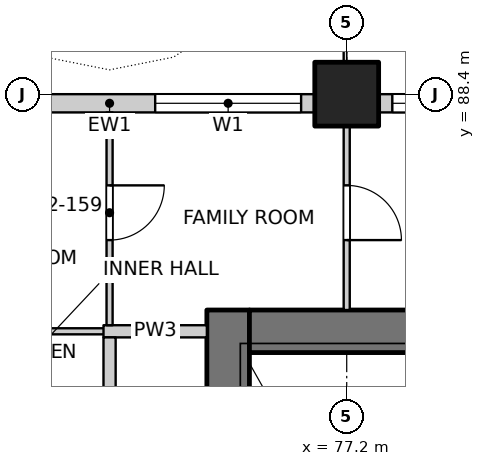
"""IFC4 building model, lengths in metres.
Left out: names, types, materials, properties, quantities, classifications, styles, units other than length and angle.
Written with IfcOpenShell. Run it as: python <this file> out.ifc"""

import sys

from ifc_helpers import new_model, si_unit, direction, frame, frame_2d, origin, origin_2d, place, context, subcontext, project, spatial, rectangle, extrude, element, fill, save


model = new_model("IFC4")
c1 = context("Model", 3, precision=1e-05, world=origin(), true_north=direction((0.0, 1.0)))
c2 = subcontext(c1, "Body", "Model", "MODEL_VIEW")
j1 = project(units=[si_unit("LENGTHUNIT", "METRE"), si_unit("PLANEANGLEUNIT", "RADIAN")], contexts=[c1])
p1 = place(None, origin())
s1 = spatial("IfcSite", under=j1, at=p1, CompositionType="ELEMENT")
p2 = place(p1, origin())
s2 = spatial("IfcBuilding", under=s1, at=p2, CompositionType="ELEMENT")
p3 = place(p2, frame((0.0, 0.0, 36.5)))
s3 = spatial("IfcBuildingStorey", under=s2, at=p3, CompositionType="ELEMENT", Elevation=36.5)
p4 = place(p3, frame((77.2, 88.4, -0.25), z_axis=(0.0, 0.0, 1.0), x_axis=(1.0, 0.0, 0.0)))
e1 = element("IfcColumn", 1, at=p4, inside=s3, PredefinedType="COLUMN", context=c2, shape_type="SweptSolid", body=[
    extrude(rectangle(XDim=1.05, YDim=1.05, at=origin_2d()), origin(), (0.0, 0.0, 1.0), 3.4),
])
p5 = place(p3, frame((75.25, 77.3, -0.25), z_axis=(0.0, 0.0, 1.0), x_axis=(0.0, 1.0, 0.0)))
e2 = element("IfcWall", 2, at=p5, inside=s3, PredefinedType="SOLIDWALL", context=c2, shape_type="SweptSolid", body=[
    extrude(rectangle(XDim=7.55, YDim=0.7, at=frame_2d((3.775, 0.0))), origin(), (0.0, 0.0, 1.0), 3.4),
])
p6 = place(p5, frame((0.3, 0.0, 0.25)))
e3 = element("IfcOpeningElement", 3, at=p6, cuts=e2, PredefinedType="OPENING", context=c2, shape_type="SweptSolid", body=[
    extrude(rectangle(XDim=1.2, YDim=2.1, at=frame_2d((0.6, 1.05))), frame((0.0, 0.36, 0.0), z_axis=(0.0, -1.0, 0.0), x_axis=(1.0, 0.0, 0.0)), (0.0, 0.0, 1.0), 0.72),
])
p7 = place(p3, frame((75.6, 84.5, -0.25), z_axis=(0.0, 0.0, 1.0), x_axis=(1.0, 0.0, 0.0)))
e4 = element("IfcWall", 4, at=p7, inside=s3, PredefinedType="SOLIDWALL", context=c2, shape_type="SweptSolid", body=[
    extrude(rectangle(XDim=18.8, YDim=0.7, at=frame_2d((9.4, 0.0))), origin(), (0.0, 0.0, 1.0), 3.4),
])
p8 = place(p3, frame((69.925, 88.25, 0.0), z_axis=(0.0, 0.0, 1.0), x_axis=(1.0, 0.0, 0.0)))
e5 = element("IfcWall", 5, at=p8, inside=s3, PredefinedType="SOLIDWALL", context=c2, shape_type="SweptSolid", body=[
    extrude(rectangle(XDim=6.75, YDim=0.3, at=frame_2d((3.375, 0.0))), origin(), (0.0, 0.0, 1.0), 2.7),
])
p9 = place(p8, frame((0.525, 0.0, 0.0)))
e6 = element("IfcOpeningElement", 6, at=p9, cuts=e5, PredefinedType="OPENING", context=c2, shape_type="SweptSolid", body=[
    extrude(rectangle(XDim=1.8, YDim=2.4, at=frame_2d((0.9, 1.2))), frame((0.0, 0.16, 0.0), z_axis=(0.0, -1.0, 0.0), x_axis=(1.0, 0.0, 0.0)), (0.0, 0.0, 1.0), 0.32),
])
p10 = place(p8, frame((4.125, 0.0, 0.9)))
e7 = element("IfcOpeningElement", 7, at=p10, cuts=e5, PredefinedType="OPENING", context=c2, shape_type="SweptSolid", body=[
    extrude(rectangle(XDim=2.4, YDim=1.8, at=frame_2d((1.2, 0.9))), frame((0.0, 0.16, 0.0), z_axis=(0.0, -1.0, 0.0), x_axis=(1.0, 0.0, 0.0)), (0.0, 0.0, 1.0), 0.32),
])
p11 = place(p3, frame((77.725, 88.25, 0.0), z_axis=(0.0, 0.0, 1.0), x_axis=(1.0, 0.0, 0.0)))
e8 = element("IfcWall", 8, at=p11, inside=s3, PredefinedType="SOLIDWALL", context=c2, shape_type="SweptSolid", body=[
    extrude(rectangle(XDim=6.75, YDim=0.3, at=frame_2d((3.375, 0.0))), origin(), (0.0, 0.0, 1.0), 2.7),
])
p12 = place(p11, frame((0.225, 0.0, 0.9)))
e9 = element("IfcOpeningElement", 9, at=p12, cuts=e8, PredefinedType="OPENING", context=c2, shape_type="SweptSolid", body=[
    extrude(rectangle(XDim=2.4, YDim=1.8, at=frame_2d((1.2, 0.9))), frame((0.0, 0.16, 0.0), z_axis=(0.0, -1.0, 0.0), x_axis=(1.0, 0.0, 0.0)), (0.0, 0.0, 1.0), 0.32),
])
p13 = place(p11, frame((4.125, 0.0, 0.9)))
e10 = element("IfcOpeningElement", 10, at=p13, cuts=e8, PredefinedType="OPENING", context=c2, shape_type="SweptSolid", body=[
    extrude(rectangle(XDim=2.4, YDim=1.8, at=frame_2d((1.2, 0.9))), frame((0.0, 0.16, 0.0), z_axis=(0.0, -1.0, 0.0), x_axis=(1.0, 0.0, 0.0)), (0.0, 0.0, 1.0), 0.32),
])
p14 = place(p3, frame((61.9, 84.5, 0.0), z_axis=(0.0, 0.0, 1.0), x_axis=(1.0, 0.0, 0.0)))
e11 = element("IfcWall", 11, at=p14, inside=s3, PredefinedType="PARTITIONING", context=c2, shape_type="SweptSolid", body=[
    extrude(rectangle(XDim=11.5, YDim=0.1, at=frame_2d((5.75, 0.0))), origin(), (0.0, 0.0, 1.0), 3.15),
])
p15 = place(p14, frame((7.965, 0.0, 0.0)))
e12 = element("IfcOpeningElement", 12, at=p15, cuts=e11, PredefinedType="OPENING", context=c2, shape_type="SweptSolid", body=[
    extrude(rectangle(XDim=0.9, YDim=2.1, at=frame_2d((0.45, 1.05))), frame((0.0, 0.06, 0.0), z_axis=(0.0, -1.0, 0.0), x_axis=(1.0, 0.0, 0.0)), (0.0, 0.0, 1.0), 0.12),
])
p16 = place(p3, frame((73.2, 84.5, 0.0), z_axis=(0.0, 0.0, 1.0), x_axis=(1.0, 0.0, 0.0)))
e13 = element("IfcWall", 13, at=p16, inside=s3, PredefinedType="PARTITIONING", context=c2, shape_type="SweptSolid", body=[
    extrude(rectangle(XDim=1.7, YDim=0.2, at=frame_2d((0.85, 0.0))), origin(), (0.0, 0.0, 1.0), 3.15),
])
p17 = place(p3, frame((73.3, 53.4, 0.0), z_axis=(0.0, 0.0, 1.0), x_axis=(0.0, 1.0, 0.0)))
e14 = element("IfcWall", 14, at=p17, inside=s3, PredefinedType="PARTITIONING", context=c2, shape_type="SweptSolid", body=[
    extrude(rectangle(XDim=31.0, YDim=0.2, at=frame_2d((15.5, 0.0))), origin(), (0.0, 0.0, 1.0), 3.15),
])
p18 = place(p17, frame((2.675, 0.0, 0.0)))
e15 = element("IfcOpeningElement", 15, at=p18, cuts=e14, PredefinedType="OPENING", context=c2, shape_type="SweptSolid", body=[
    extrude(rectangle(XDim=1.0, YDim=2.1, at=frame_2d((0.5, 1.05))), frame((0.0, 0.11, 0.0), z_axis=(0.0, -1.0, 0.0), x_axis=(1.0, 0.0, 0.0)), (0.0, 0.0, 1.0), 0.22),
])
p19 = place(p17, frame((18.125, 0.0, 0.0)))
e16 = element("IfcOpeningElement", 16, at=p19, cuts=e14, PredefinedType="OPENING", context=c2, shape_type="SweptSolid", body=[
    extrude(rectangle(XDim=1.0, YDim=2.1, at=frame_2d((0.5, 1.05))), frame((0.0, 0.11, 0.0), z_axis=(0.0, -1.0, 0.0), x_axis=(1.0, 0.0, 0.0)), (0.0, 0.0, 1.0), 0.22),
])
p20 = place(p17, frame((26.025, 0.0, 0.0)))
e17 = element("IfcOpeningElement", 17, at=p20, cuts=e14, PredefinedType="OPENING", context=c2, shape_type="SweptSolid", body=[
    extrude(rectangle(XDim=1.0, YDim=2.1, at=frame_2d((0.5, 1.05))), frame((0.0, 0.11, 0.0), z_axis=(0.0, -1.0, 0.0), x_axis=(1.0, 0.0, 0.0)), (0.0, 0.0, 1.0), 0.22),
])
p21 = place(p3, frame((73.3, 84.6, 0.0), z_axis=(0.0, 0.0, 1.0), x_axis=(0.0, 1.0, 0.0)))
e18 = element("IfcWall", 18, at=p21, inside=s3, PredefinedType="PARTITIONING", context=c2, shape_type="SweptSolid", body=[
    extrude(rectangle(XDim=3.5, YDim=0.1, at=frame_2d((1.75, 0.0))), origin(), (0.0, 0.0, 1.0), 3.15),
])
p22 = place(p21, frame((1.4, 0.0, 0.0)))
e19 = element("IfcOpeningElement", 19, at=p22, cuts=e18, PredefinedType="OPENING", context=c2, shape_type="SweptSolid", body=[
    extrude(rectangle(XDim=0.9, YDim=2.1, at=frame_2d((0.45, 1.05))), frame((0.0, 0.06, 0.0), z_axis=(0.0, -1.0, 0.0), x_axis=(1.0, 0.0, 0.0)), (0.0, 0.0, 1.0), 0.12),
])
p23 = place(p3, frame((77.2, 84.85, 0.0), z_axis=(0.0, 0.0, 1.0), x_axis=(0.0, 1.0, 0.0)))
e20 = element("IfcWall", 20, at=p23, inside=s3, PredefinedType="PARTITIONING", context=c2, shape_type="SweptSolid", body=[
    extrude(rectangle(XDim=3.25, YDim=0.1, at=frame_2d((1.625, 0.0))), origin(), (0.0, 0.0, 1.0), 3.15),
])
p24 = place(p23, frame((1.15, 0.0, 0.0)))
e21 = element("IfcOpeningElement", 21, at=p24, cuts=e20, PredefinedType="OPENING", context=c2, shape_type="SweptSolid", body=[
    extrude(rectangle(XDim=0.9, YDim=2.1, at=frame_2d((0.45, 1.05))), frame((0.0, 0.06, 0.0), z_axis=(0.0, -1.0, 0.0), x_axis=(1.0, 0.0, 0.0)), (0.0, 0.0, 1.0), 0.12),
])
p25 = place(p10, origin())
e22 = element("IfcWindow", 22, at=p25, inside=s3, PartitioningType="DOUBLE_PANEL_VERTICAL", PredefinedType="WINDOW", context=c2, shape_type="SweptSolid", body=[
    extrude(rectangle(XDim=2.4, YDim=1.8, at=frame_2d((1.2, 0.9))), frame((0.0, 0.03, 0.0), z_axis=(0.0, -1.0, 0.0), x_axis=(1.0, 0.0, 0.0)), (0.0, 0.0, 1.0), 0.06),
])
fill(e7, e22)
p26 = place(p12, origin())
e23 = element("IfcWindow", 23, at=p26, inside=s3, PartitioningType="DOUBLE_PANEL_VERTICAL", PredefinedType="WINDOW", context=c2, shape_type="SweptSolid", body=[
    extrude(rectangle(XDim=2.4, YDim=1.8, at=frame_2d((1.2, 0.9))), frame((0.0, 0.03, 0.0), z_axis=(0.0, -1.0, 0.0), x_axis=(1.0, 0.0, 0.0)), (0.0, 0.0, 1.0), 0.06),
])
fill(e9, e23)
p27 = place(p22, origin())
e24 = element("IfcDoor", 24, at=p27, inside=s3, OperationType="SINGLE_SWING_LEFT", PredefinedType="DOOR", context=c2, shape_type="SweptSolid", body=[
    extrude(rectangle(XDim=0.9, YDim=2.1, at=frame_2d((0.45, 1.05))), frame((0.0, 0.025, 0.0), z_axis=(0.0, -1.0, 0.0), x_axis=(1.0, 0.0, 0.0)), (0.0, 0.0, 1.0), 0.05),
])
fill(e19, e24)
p28 = place(p24, origin())
e25 = element("IfcDoor", 25, at=p28, inside=s3, OperationType="SINGLE_SWING_RIGHT", PredefinedType="DOOR", context=c2, shape_type="SweptSolid", body=[
    extrude(rectangle(XDim=0.9, YDim=2.1, at=frame_2d((0.45, 1.05))), frame((0.0, 0.025, 0.0), z_axis=(0.0, -1.0, 0.0), x_axis=(1.0, 0.0, 0.0)), (0.0, 0.0, 1.0), 0.05),
])
fill(e21, e25)
save(model, sys.argv[1])
